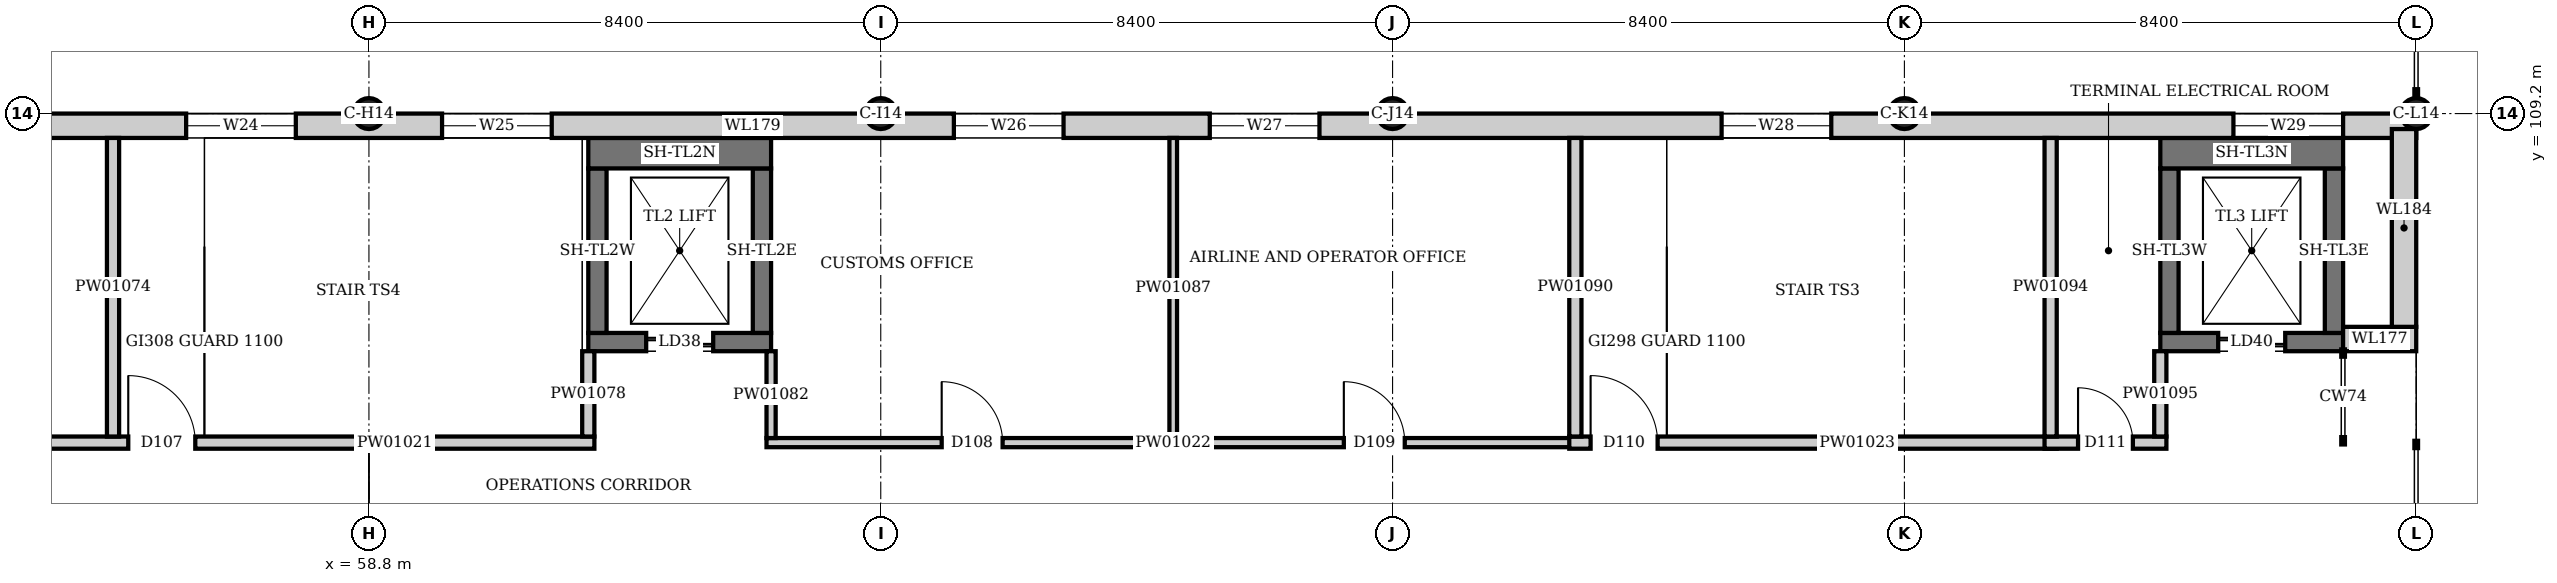
"""IFC4 building model, lengths in metres.
Left out: names, types, materials, properties, quantities, classifications, styles, units other than length and angle.
Written with IfcOpenShell. Run it as: python <this file> out.ifc"""

import sys

from ifc_helpers import new_model, si_unit, direction, frame, frame_2d, origin, origin_2d, place, context, subcontext, project, spatial, rectangle, hollow_circle, extrude, element, fill, save


model = new_model("IFC4")
c1 = context("Model", 3, precision=1e-05, world=origin(), true_north=direction((0.0, 1.0)))
c2 = subcontext(c1, "Body", "Model", "MODEL_VIEW")
j1 = project(units=[si_unit("LENGTHUNIT", "METRE"), si_unit("PLANEANGLEUNIT", "RADIAN")], contexts=[c1])
p1 = place(None, origin())
s1 = spatial("IfcSite", under=j1, at=p1, CompositionType="ELEMENT")
p2 = place(p1, origin())
s2 = spatial("IfcBuilding", under=s1, at=p2, CompositionType="ELEMENT")
p3 = place(p2, frame((0.0, 0.0, 6.0)))
s3 = spatial("IfcBuildingStorey", under=s2, at=p3, CompositionType="ELEMENT", Elevation=6.0)
for number, where, z_axis, x_axis in (
    (1, (58.8, 109.2, 0.0), (0.0, 0.0, 1.0), (1.0, 0.0, 0.0)),
    (2, (67.2, 109.2, 0.0), (0.0, 0.0, 1.0), (1.0, 0.0, 0.0)),
    (3, (75.6, 109.2, 0.0), (0.0, 0.0, 1.0), (1.0, 0.0, 0.0)),
    (4, (84.0, 109.2, 0.0), (0.0, 0.0, 1.0), (1.0, 0.0, 0.0)),
    (5, (92.4, 109.2, 0.0), (0.0, 0.0, 1.0), (1.0, 0.0, 0.0)),
):
    element("IfcColumn", number, at=place(p3, frame(where, z_axis=z_axis, x_axis=x_axis)), inside=s3, PredefinedType="COLUMN", context=c2, shape_type="SweptSolid", body=[
        extrude(hollow_circle(Radius=0.254, WallThickness=0.016, at=origin_2d()), origin(), (0.0, 0.0, 1.0), 4.8),
    ])
p4 = place(p3, frame((62.4, 105.45, 0.0), z_axis=(0.0, 0.0, 1.0), x_axis=(1.0, 0.0, 0.0)))
e6 = element("IfcWall", 6, at=p4, inside=s3, PredefinedType="SHEAR", context=c2, shape_type="SweptSolid", body=[
    extrude(rectangle(XDim=3.0, YDim=0.3, at=frame_2d((1.5, 0.0))), origin(), (0.0, 0.0, 1.0), 4.65),
])
p5 = place(p4, frame((0.95, 0.0, 0.0)))
e7 = element("IfcOpeningElement", 7, at=p5, cuts=e6, PredefinedType="OPENING", context=c2, shape_type="SweptSolid", body=[
    extrude(rectangle(XDim=1.1, YDim=2.1, at=frame_2d((0.55, 1.05))), frame((0.0, 0.16, 0.0), z_axis=(0.0, -1.0, 0.0), x_axis=(1.0, 0.0, 0.0)), (0.0, 0.0, 1.0), 0.32),
])
for number, where, z_axis, x_axis in (
    (8, (65.25, 105.6, 0.0), (0.0, 0.0, 1.0), (0.0, 1.0, 0.0)),
    (9, (62.55, 105.6, 0.0), (0.0, 0.0, 1.0), (0.0, 1.0, 0.0)),
):
    element("IfcWall", number, at=place(p3, frame(where, z_axis=z_axis, x_axis=x_axis)), inside=s3, PredefinedType="SHEAR", context=c2, shape_type="SweptSolid", body=[
        extrude(rectangle(XDim=2.7, YDim=0.3, at=frame_2d((1.35, 0.0))), origin(), (0.0, 0.0, 1.0), 4.65),
    ])
p6 = place(p3, frame((62.4, 108.55, 0.0), z_axis=(0.0, 0.0, 1.0), x_axis=(1.0, 0.0, 0.0)))
e10 = element("IfcWall", 10, at=p6, inside=s3, PredefinedType="SHEAR", context=c2, shape_type="SweptSolid", body=[
    extrude(rectangle(XDim=3.0, YDim=0.5, at=frame_2d((1.5, 0.0))), origin(), (0.0, 0.0, 1.0), 4.65),
])
p7 = place(p3, frame((88.2, 105.45, 0.0), z_axis=(0.0, 0.0, 1.0), x_axis=(1.0, 0.0, 0.0)))
e11 = element("IfcWall", 11, at=p7, inside=s3, PredefinedType="SHEAR", context=c2, shape_type="SweptSolid", body=[
    extrude(rectangle(XDim=3.0, YDim=0.3, at=frame_2d((1.5, 0.0))), origin(), (0.0, 0.0, 1.0), 4.65),
])
p8 = place(p7, frame((0.95, 0.0, 0.0)))
e12 = element("IfcOpeningElement", 12, at=p8, cuts=e11, PredefinedType="OPENING", context=c2, shape_type="SweptSolid", body=[
    extrude(rectangle(XDim=1.1, YDim=2.1, at=frame_2d((0.55, 1.05))), frame((0.0, 0.16, 0.0), z_axis=(0.0, -1.0, 0.0), x_axis=(1.0, 0.0, 0.0)), (0.0, 0.0, 1.0), 0.32),
])
for number, where, z_axis, x_axis in (
    (13, (91.05, 105.6, 0.0), (0.0, 0.0, 1.0), (0.0, 1.0, 0.0)),
    (14, (88.35, 105.6, 0.0), (0.0, 0.0, 1.0), (0.0, 1.0, 0.0)),
):
    element("IfcWall", number, at=place(p3, frame(where, z_axis=z_axis, x_axis=x_axis)), inside=s3, PredefinedType="SHEAR", context=c2, shape_type="SweptSolid", body=[
        extrude(rectangle(XDim=2.7, YDim=0.3, at=frame_2d((1.35, 0.0))), origin(), (0.0, 0.0, 1.0), 4.65),
    ])
p9 = place(p3, frame((88.2, 108.55, 0.0), z_axis=(0.0, 0.0, 1.0), x_axis=(1.0, 0.0, 0.0)))
e15 = element("IfcWall", 15, at=p9, inside=s3, PredefinedType="SHEAR", context=c2, shape_type="SweptSolid", body=[
    extrude(rectangle(XDim=3.0, YDim=0.5, at=frame_2d((1.5, 0.0))), origin(), (0.0, 0.0, 1.0), 4.65),
])
p10 = place(p3, frame((91.2, 105.5, 0.0), z_axis=(0.0, 0.0, 1.0), x_axis=(1.0, 0.0, 0.0)))
e16 = element("IfcWall", 16, at=p10, inside=s3, PredefinedType="SOLIDWALL", context=c2, shape_type="SweptSolid", body=[
    extrude(rectangle(XDim=1.2, YDim=0.4, at=frame_2d((0.6, 0.0))), origin(), (0.0, 0.0, 1.0), 4.6),
])
p11 = place(p3, frame((25.2, 109.0, 0.0), z_axis=(0.0, 0.0, 1.0), x_axis=(1.0, 0.0, 0.0)))
e17 = element("IfcWall", 17, at=p11, inside=s3, PredefinedType="SOLIDWALL", context=c2, shape_type="SweptSolid", body=[
    extrude(rectangle(XDim=67.2, YDim=0.4, at=frame_2d((33.6, 0.0))), origin(), (0.0, 0.0, 1.0), 4.6),
])
p12 = place(p11, frame((1.2, 0.0, 0.9)))
e18 = element("IfcOpeningElement", 18, at=p12, cuts=e17, PredefinedType="OPENING", context=c2, shape_type="SweptSolid", body=[
    extrude(rectangle(XDim=1.8, YDim=1.8, at=frame_2d((0.9, 0.9))), frame((0.0, 0.21, 0.0), z_axis=(0.0, -1.0, 0.0), x_axis=(1.0, 0.0, 0.0)), (0.0, 0.0, 1.0), 0.42),
])
p13 = place(p11, frame((5.4, 0.0, 0.9)))
e19 = element("IfcOpeningElement", 19, at=p13, cuts=e17, PredefinedType="OPENING", context=c2, shape_type="SweptSolid", body=[
    extrude(rectangle(XDim=1.8, YDim=1.8, at=frame_2d((0.9, 0.9))), frame((0.0, 0.21, 0.0), z_axis=(0.0, -1.0, 0.0), x_axis=(1.0, 0.0, 0.0)), (0.0, 0.0, 1.0), 0.42),
])
p14 = place(p11, frame((18.0, 0.0, 0.9)))
e20 = element("IfcOpeningElement", 20, at=p14, cuts=e17, PredefinedType="OPENING", context=c2, shape_type="SweptSolid", body=[
    extrude(rectangle(XDim=1.8, YDim=1.8, at=frame_2d((0.9, 0.9))), frame((0.0, 0.21, 0.0), z_axis=(0.0, -1.0, 0.0), x_axis=(1.0, 0.0, 0.0)), (0.0, 0.0, 1.0), 0.42),
])
p15 = place(p11, frame((22.2, 0.0, 0.9)))
e21 = element("IfcOpeningElement", 21, at=p15, cuts=e17, PredefinedType="OPENING", context=c2, shape_type="SweptSolid", body=[
    extrude(rectangle(XDim=1.8, YDim=1.8, at=frame_2d((0.9, 0.9))), frame((0.0, 0.21, 0.0), z_axis=(0.0, -1.0, 0.0), x_axis=(1.0, 0.0, 0.0)), (0.0, 0.0, 1.0), 0.42),
])
p16 = place(p11, frame((26.4, 0.0, 0.9)))
e22 = element("IfcOpeningElement", 22, at=p16, cuts=e17, PredefinedType="OPENING", context=c2, shape_type="SweptSolid", body=[
    extrude(rectangle(XDim=1.8, YDim=1.8, at=frame_2d((0.9, 0.9))), frame((0.0, 0.21, 0.0), z_axis=(0.0, -1.0, 0.0), x_axis=(1.0, 0.0, 0.0)), (0.0, 0.0, 1.0), 0.42),
])
p17 = place(p11, frame((30.6, 0.0, 0.9)))
e23 = element("IfcOpeningElement", 23, at=p17, cuts=e17, PredefinedType="OPENING", context=c2, shape_type="SweptSolid", body=[
    extrude(rectangle(XDim=1.8, YDim=1.8, at=frame_2d((0.9, 0.9))), frame((0.0, 0.21, 0.0), z_axis=(0.0, -1.0, 0.0), x_axis=(1.0, 0.0, 0.0)), (0.0, 0.0, 1.0), 0.42),
])
p18 = place(p11, frame((34.8, 0.0, 0.9)))
e24 = element("IfcOpeningElement", 24, at=p18, cuts=e17, PredefinedType="OPENING", context=c2, shape_type="SweptSolid", body=[
    extrude(rectangle(XDim=1.8, YDim=1.8, at=frame_2d((0.9, 0.9))), frame((0.0, 0.21, 0.0), z_axis=(0.0, -1.0, 0.0), x_axis=(1.0, 0.0, 0.0)), (0.0, 0.0, 1.0), 0.42),
])
p19 = place(p11, frame((43.2, 0.0, 0.9)))
e25 = element("IfcOpeningElement", 25, at=p19, cuts=e17, PredefinedType="OPENING", context=c2, shape_type="SweptSolid", body=[
    extrude(rectangle(XDim=1.8, YDim=1.8, at=frame_2d((0.9, 0.9))), frame((0.0, 0.21, 0.0), z_axis=(0.0, -1.0, 0.0), x_axis=(1.0, 0.0, 0.0)), (0.0, 0.0, 1.0), 0.42),
])
p20 = place(p11, frame((47.4, 0.0, 0.9)))
e26 = element("IfcOpeningElement", 26, at=p20, cuts=e17, PredefinedType="OPENING", context=c2, shape_type="SweptSolid", body=[
    extrude(rectangle(XDim=1.8, YDim=1.8, at=frame_2d((0.9, 0.9))), frame((0.0, 0.21, 0.0), z_axis=(0.0, -1.0, 0.0), x_axis=(1.0, 0.0, 0.0)), (0.0, 0.0, 1.0), 0.42),
])
p21 = place(p11, frame((55.8, 0.0, 0.9)))
e27 = element("IfcOpeningElement", 27, at=p21, cuts=e17, PredefinedType="OPENING", context=c2, shape_type="SweptSolid", body=[
    extrude(rectangle(XDim=1.8, YDim=1.8, at=frame_2d((0.9, 0.9))), frame((0.0, 0.21, 0.0), z_axis=(0.0, -1.0, 0.0), x_axis=(1.0, 0.0, 0.0)), (0.0, 0.0, 1.0), 0.42),
])
p22 = place(p11, frame((64.2, 0.0, 0.9)))
e28 = element("IfcOpeningElement", 28, at=p22, cuts=e17, PredefinedType="OPENING", context=c2, shape_type="SweptSolid", body=[
    extrude(rectangle(XDim=1.8, YDim=1.8, at=frame_2d((0.9, 0.9))), frame((0.0, 0.21, 0.0), z_axis=(0.0, -1.0, 0.0), x_axis=(1.0, 0.0, 0.0)), (0.0, 0.0, 1.0), 0.42),
])
p23 = place(p3, frame((92.2, 105.7, 0.0), z_axis=(0.0, 0.0, 1.0), x_axis=(0.0, 1.0, 0.0)))
e29 = element("IfcWall", 29, at=p23, inside=s3, PredefinedType="SOLIDWALL", context=c2, shape_type="SweptSolid", body=[
    extrude(rectangle(XDim=3.246, YDim=0.4, at=frame_2d((1.623, 0.0))), origin(), (0.0, 0.0, 1.0), 4.6),
])
p24 = place(p3, frame((46.7, 103.8, 0.0), z_axis=(0.0, 0.0, 1.0), x_axis=(1.0, 0.0, 0.0)))
e30 = element("IfcWall", 30, at=p24, inside=s3, PredefinedType="PARTITIONING", context=c2, shape_type="SweptSolid", body=[
    extrude(rectangle(XDim=15.8, YDim=0.2, at=frame_2d((7.9, 0.0))), origin(), (0.0, 0.0, 1.0), 4.6),
])
p25 = place(p24, frame((0.35, 0.0, 0.0)))
e31 = element("IfcOpeningElement", 31, at=p25, cuts=e30, PredefinedType="OPENING", context=c2, shape_type="SweptSolid", body=[
    extrude(rectangle(XDim=1.1, YDim=2.4, at=frame_2d((0.55, 1.2))), frame((0.0, 0.11, 0.0), z_axis=(0.0, -1.0, 0.0), x_axis=(1.0, 0.0, 0.0)), (0.0, 0.0, 1.0), 0.22),
])
p26 = place(p24, frame((8.15, 0.0, 0.0)))
e32 = element("IfcOpeningElement", 32, at=p26, cuts=e30, PredefinedType="OPENING", context=c2, shape_type="SweptSolid", body=[
    extrude(rectangle(XDim=1.1, YDim=2.4, at=frame_2d((0.55, 1.2))), frame((0.0, 0.11, 0.0), z_axis=(0.0, -1.0, 0.0), x_axis=(1.0, 0.0, 0.0)), (0.0, 0.0, 1.0), 0.22),
])
p27 = place(p3, frame((65.325, 103.8, 0.0), z_axis=(0.0, 0.0, 1.0), x_axis=(1.0, 0.0, 0.0)))
e33 = element("IfcWall", 33, at=p27, inside=s3, PredefinedType="PARTITIONING", context=c2, shape_type="SweptSolid", body=[
    extrude(rectangle(XDim=13.375, YDim=0.15, at=frame_2d((6.688, 0.0))), origin(), (0.0, 0.0, 1.0), 4.6),
])
p28 = place(p27, frame((2.875, 0.0, 0.0)))
e34 = element("IfcOpeningElement", 34, at=p28, cuts=e33, PredefinedType="OPENING", context=c2, shape_type="SweptSolid", body=[
    extrude(rectangle(XDim=1.0, YDim=2.1, at=frame_2d((0.5, 1.05))), frame((0.0, 0.085, 0.0), z_axis=(0.0, -1.0, 0.0), x_axis=(1.0, 0.0, 0.0)), (0.0, 0.0, 1.0), 0.17),
])
p29 = place(p27, frame((9.475, 0.0, 0.0)))
e35 = element("IfcOpeningElement", 35, at=p29, cuts=e33, PredefinedType="OPENING", context=c2, shape_type="SweptSolid", body=[
    extrude(rectangle(XDim=1.0, YDim=2.1, at=frame_2d((0.5, 1.05))), frame((0.0, 0.085, 0.0), z_axis=(0.0, -1.0, 0.0), x_axis=(1.0, 0.0, 0.0)), (0.0, 0.0, 1.0), 0.17),
])
p30 = place(p3, frame((78.5, 103.8, 0.0), z_axis=(0.0, 0.0, 1.0), x_axis=(1.0, 0.0, 0.0)))
e36 = element("IfcWall", 36, at=p30, inside=s3, PredefinedType="PARTITIONING", context=c2, shape_type="SweptSolid", body=[
    extrude(rectangle(XDim=8.0, YDim=0.2, at=frame_2d((4.0, 0.0))), origin(), (0.0, 0.0, 1.0), 4.6),
])
p31 = place(p30, frame((0.35, 0.0, 0.0)))
e37 = element("IfcOpeningElement", 37, at=p31, cuts=e36, PredefinedType="OPENING", context=c2, shape_type="SweptSolid", body=[
    extrude(rectangle(XDim=1.1, YDim=2.4, at=frame_2d((0.55, 1.2))), frame((0.0, 0.11, 0.0), z_axis=(0.0, -1.0, 0.0), x_axis=(1.0, 0.0, 0.0)), (0.0, 0.0, 1.0), 0.22),
])
p32 = place(p3, frame((86.3, 103.8, 0.0), z_axis=(0.0, 0.0, 1.0), x_axis=(1.0, 0.0, 0.0)))
e38 = element("IfcWall", 38, at=p32, inside=s3, PredefinedType="PARTITIONING", context=c2, shape_type="SweptSolid", body=[
    extrude(rectangle(XDim=2.0, YDim=0.2, at=frame_2d((1.0, 0.0))), origin(), (0.0, 0.0, 1.0), 4.6),
])
p33 = place(p32, frame((0.55, 0.0, 0.0)))
e39 = element("IfcOpeningElement", 39, at=p33, cuts=e38, PredefinedType="OPENING", context=c2, shape_type="SweptSolid", body=[
    extrude(rectangle(XDim=0.9, YDim=2.1, at=frame_2d((0.45, 1.05))), frame((0.0, 0.11, 0.0), z_axis=(0.0, -1.0, 0.0), x_axis=(1.0, 0.0, 0.0)), (0.0, 0.0, 1.0), 0.22),
])
p34 = place(p3, frame((54.6, 103.9, 0.0), z_axis=(0.0, 0.0, 1.0), x_axis=(0.0, 1.0, 0.0)))
e40 = element("IfcWall", 40, at=p34, inside=s3, PredefinedType="PARTITIONING", context=c2, shape_type="SweptSolid", body=[
    extrude(rectangle(XDim=4.9, YDim=0.2, at=frame_2d((2.45, 0.0))), origin(), (0.0, 0.0, 1.0), 4.6),
])
p35 = place(p3, frame((62.4, 103.9, 0.0), z_axis=(0.0, 0.0, 1.0), x_axis=(0.0, 1.0, 0.0)))
e41 = element("IfcWall", 41, at=p35, inside=s3, PredefinedType="PARTITIONING", context=c2, shape_type="SweptSolid", body=[
    extrude(rectangle(XDim=1.4, YDim=0.2, at=frame_2d((0.7, 0.0))), origin(), (0.0, 0.0, 1.0), 4.6),
])
p36 = place(p3, frame((65.4, 103.875, 0.0), z_axis=(0.0, 0.0, 1.0), x_axis=(0.0, 1.0, 0.0)))
e42 = element("IfcWall", 42, at=p36, inside=s3, PredefinedType="PARTITIONING", context=c2, shape_type="SweptSolid", body=[
    extrude(rectangle(XDim=1.425, YDim=0.15, at=frame_2d((0.712, 0.0))), origin(), (0.0, 0.0, 1.0), 4.6),
])
p37 = place(p3, frame((72.0, 103.875, 0.0), z_axis=(0.0, 0.0, 1.0), x_axis=(0.0, 1.0, 0.0)))
e43 = element("IfcWall", 43, at=p37, inside=s3, PredefinedType="PARTITIONING", context=c2, shape_type="SweptSolid", body=[
    extrude(rectangle(XDim=4.925, YDim=0.125, at=frame_2d((2.462, 0.0))), origin(), (0.0, 0.0, 1.0), 4.6),
])
for number, where, z_axis, x_axis in (
    (44, (78.6, 103.9, 0.0), (0.0, 0.0, 1.0), (0.0, 1.0, 0.0)),
    (45, (86.4, 103.9, 0.0), (0.0, 0.0, 1.0), (0.0, 1.0, 0.0)),
):
    element("IfcWall", number, at=place(p3, frame(where, z_axis=z_axis, x_axis=x_axis)), inside=s3, PredefinedType="PARTITIONING", context=c2, shape_type="SweptSolid", body=[
        extrude(rectangle(XDim=4.9, YDim=0.2, at=frame_2d((2.45, 0.0))), origin(), (0.0, 0.0, 1.0), 4.6),
    ])
p38 = place(p3, frame((88.2, 103.9, 0.0), z_axis=(0.0, 0.0, 1.0), x_axis=(0.0, 1.0, 0.0)))
e46 = element("IfcWall", 46, at=p38, inside=s3, PredefinedType="PARTITIONING", context=c2, shape_type="SweptSolid", body=[
    extrude(rectangle(XDim=1.4, YDim=0.2, at=frame_2d((0.7, 0.0))), origin(), (0.0, 0.0, 1.0), 4.6),
])
p39 = place(p17, origin())
e47 = element("IfcWindow", 47, at=p39, inside=s3, PartitioningType="SINGLE_PANEL", PredefinedType="WINDOW", context=c2, shape_type="SweptSolid", body=[
    extrude(rectangle(XDim=1.8, YDim=1.8, at=frame_2d((0.9, 0.9))), frame((0.0, 0.03, 0.0), z_axis=(0.0, -1.0, 0.0), x_axis=(1.0, 0.0, 0.0)), (0.0, 0.0, 1.0), 0.06),
])
fill(e23, e47)
p40 = place(p18, origin())
e48 = element("IfcWindow", 48, at=p40, inside=s3, PartitioningType="SINGLE_PANEL", PredefinedType="WINDOW", context=c2, shape_type="SweptSolid", body=[
    extrude(rectangle(XDim=1.8, YDim=1.8, at=frame_2d((0.9, 0.9))), frame((0.0, 0.03, 0.0), z_axis=(0.0, -1.0, 0.0), x_axis=(1.0, 0.0, 0.0)), (0.0, 0.0, 1.0), 0.06),
])
fill(e24, e48)
p41 = place(p19, origin())
e49 = element("IfcWindow", 49, at=p41, inside=s3, PartitioningType="SINGLE_PANEL", PredefinedType="WINDOW", context=c2, shape_type="SweptSolid", body=[
    extrude(rectangle(XDim=1.8, YDim=1.8, at=frame_2d((0.9, 0.9))), frame((0.0, 0.03, 0.0), z_axis=(0.0, -1.0, 0.0), x_axis=(1.0, 0.0, 0.0)), (0.0, 0.0, 1.0), 0.06),
])
fill(e25, e49)
p42 = place(p20, origin())
e50 = element("IfcWindow", 50, at=p42, inside=s3, PartitioningType="SINGLE_PANEL", PredefinedType="WINDOW", context=c2, shape_type="SweptSolid", body=[
    extrude(rectangle(XDim=1.8, YDim=1.8, at=frame_2d((0.9, 0.9))), frame((0.0, 0.03, 0.0), z_axis=(0.0, -1.0, 0.0), x_axis=(1.0, 0.0, 0.0)), (0.0, 0.0, 1.0), 0.06),
])
fill(e26, e50)
p43 = place(p21, origin())
e51 = element("IfcWindow", 51, at=p43, inside=s3, PartitioningType="SINGLE_PANEL", PredefinedType="WINDOW", context=c2, shape_type="SweptSolid", body=[
    extrude(rectangle(XDim=1.8, YDim=1.8, at=frame_2d((0.9, 0.9))), frame((0.0, 0.03, 0.0), z_axis=(0.0, -1.0, 0.0), x_axis=(1.0, 0.0, 0.0)), (0.0, 0.0, 1.0), 0.06),
])
fill(e27, e51)
p44 = place(p22, origin())
e52 = element("IfcWindow", 52, at=p44, inside=s3, PartitioningType="SINGLE_PANEL", PredefinedType="WINDOW", context=c2, shape_type="SweptSolid", body=[
    extrude(rectangle(XDim=1.8, YDim=1.8, at=frame_2d((0.9, 0.9))), frame((0.0, 0.03, 0.0), z_axis=(0.0, -1.0, 0.0), x_axis=(1.0, 0.0, 0.0)), (0.0, 0.0, 1.0), 0.06),
])
fill(e28, e52)
p45 = place(p26, origin())
e53 = element("IfcDoor", 53, at=p45, inside=s3, OperationType="SINGLE_SWING_LEFT", PredefinedType="DOOR", context=c2, shape_type="SweptSolid", body=[
    extrude(rectangle(XDim=1.1, YDim=2.4, at=frame_2d((0.55, 1.2))), frame((0.0, 0.025, 0.0), z_axis=(0.0, -1.0, 0.0), x_axis=(1.0, 0.0, 0.0)), (0.0, 0.0, 1.0), 0.05),
])
fill(e32, e53)
p46 = place(p28, origin())
e54 = element("IfcDoor", 54, at=p46, inside=s3, OperationType="SINGLE_SWING_LEFT", PredefinedType="DOOR", context=c2, shape_type="SweptSolid", body=[
    extrude(rectangle(XDim=1.0, YDim=2.1, at=frame_2d((0.5, 1.05))), frame((0.0, 0.025, 0.0), z_axis=(0.0, -1.0, 0.0), x_axis=(1.0, 0.0, 0.0)), (0.0, 0.0, 1.0), 0.05),
])
fill(e34, e54)
p47 = place(p29, origin())
e55 = element("IfcDoor", 55, at=p47, inside=s3, OperationType="SINGLE_SWING_LEFT", PredefinedType="DOOR", context=c2, shape_type="SweptSolid", body=[
    extrude(rectangle(XDim=1.0, YDim=2.1, at=frame_2d((0.5, 1.05))), frame((0.0, 0.025, 0.0), z_axis=(0.0, -1.0, 0.0), x_axis=(1.0, 0.0, 0.0)), (0.0, 0.0, 1.0), 0.05),
])
fill(e35, e55)
p48 = place(p31, origin())
e56 = element("IfcDoor", 56, at=p48, inside=s3, OperationType="SINGLE_SWING_LEFT", PredefinedType="DOOR", context=c2, shape_type="SweptSolid", body=[
    extrude(rectangle(XDim=1.1, YDim=2.4, at=frame_2d((0.55, 1.2))), frame((0.0, 0.025, 0.0), z_axis=(0.0, -1.0, 0.0), x_axis=(1.0, 0.0, 0.0)), (0.0, 0.0, 1.0), 0.05),
])
fill(e37, e56)
p49 = place(p33, origin())
e57 = element("IfcDoor", 57, at=p49, inside=s3, OperationType="SINGLE_SWING_LEFT", PredefinedType="DOOR", context=c2, shape_type="SweptSolid", body=[
    extrude(rectangle(XDim=0.9, YDim=2.1, at=frame_2d((0.45, 1.05))), frame((0.0, 0.025, 0.0), z_axis=(0.0, -1.0, 0.0), x_axis=(1.0, 0.0, 0.0)), (0.0, 0.0, 1.0), 0.05),
])
fill(e39, e57)
p50 = place(p5, origin())
e58 = element("IfcDoor", 58, at=p50, inside=s3, OperationType="SLIDING_TO_LEFT", PredefinedType="DOOR", context=c2, shape_type="SweptSolid", body=[
    extrude(rectangle(XDim=1.1, YDim=2.1, at=frame_2d((0.55, 1.05))), frame((0.0, 0.025, 0.0), z_axis=(0.0, -1.0, 0.0), x_axis=(1.0, 0.0, 0.0)), (0.0, 0.0, 1.0), 0.05),
])
fill(e7, e58)
p51 = place(p8, origin())
e59 = element("IfcDoor", 59, at=p51, inside=s3, OperationType="SLIDING_TO_LEFT", PredefinedType="DOOR", context=c2, shape_type="SweptSolid", body=[
    extrude(rectangle(XDim=1.1, YDim=2.1, at=frame_2d((0.55, 1.05))), frame((0.0, 0.025, 0.0), z_axis=(0.0, -1.0, 0.0), x_axis=(1.0, 0.0, 0.0)), (0.0, 0.0, 1.0), 0.05),
])
fill(e12, e59)
save(model, sys.argv[1])
